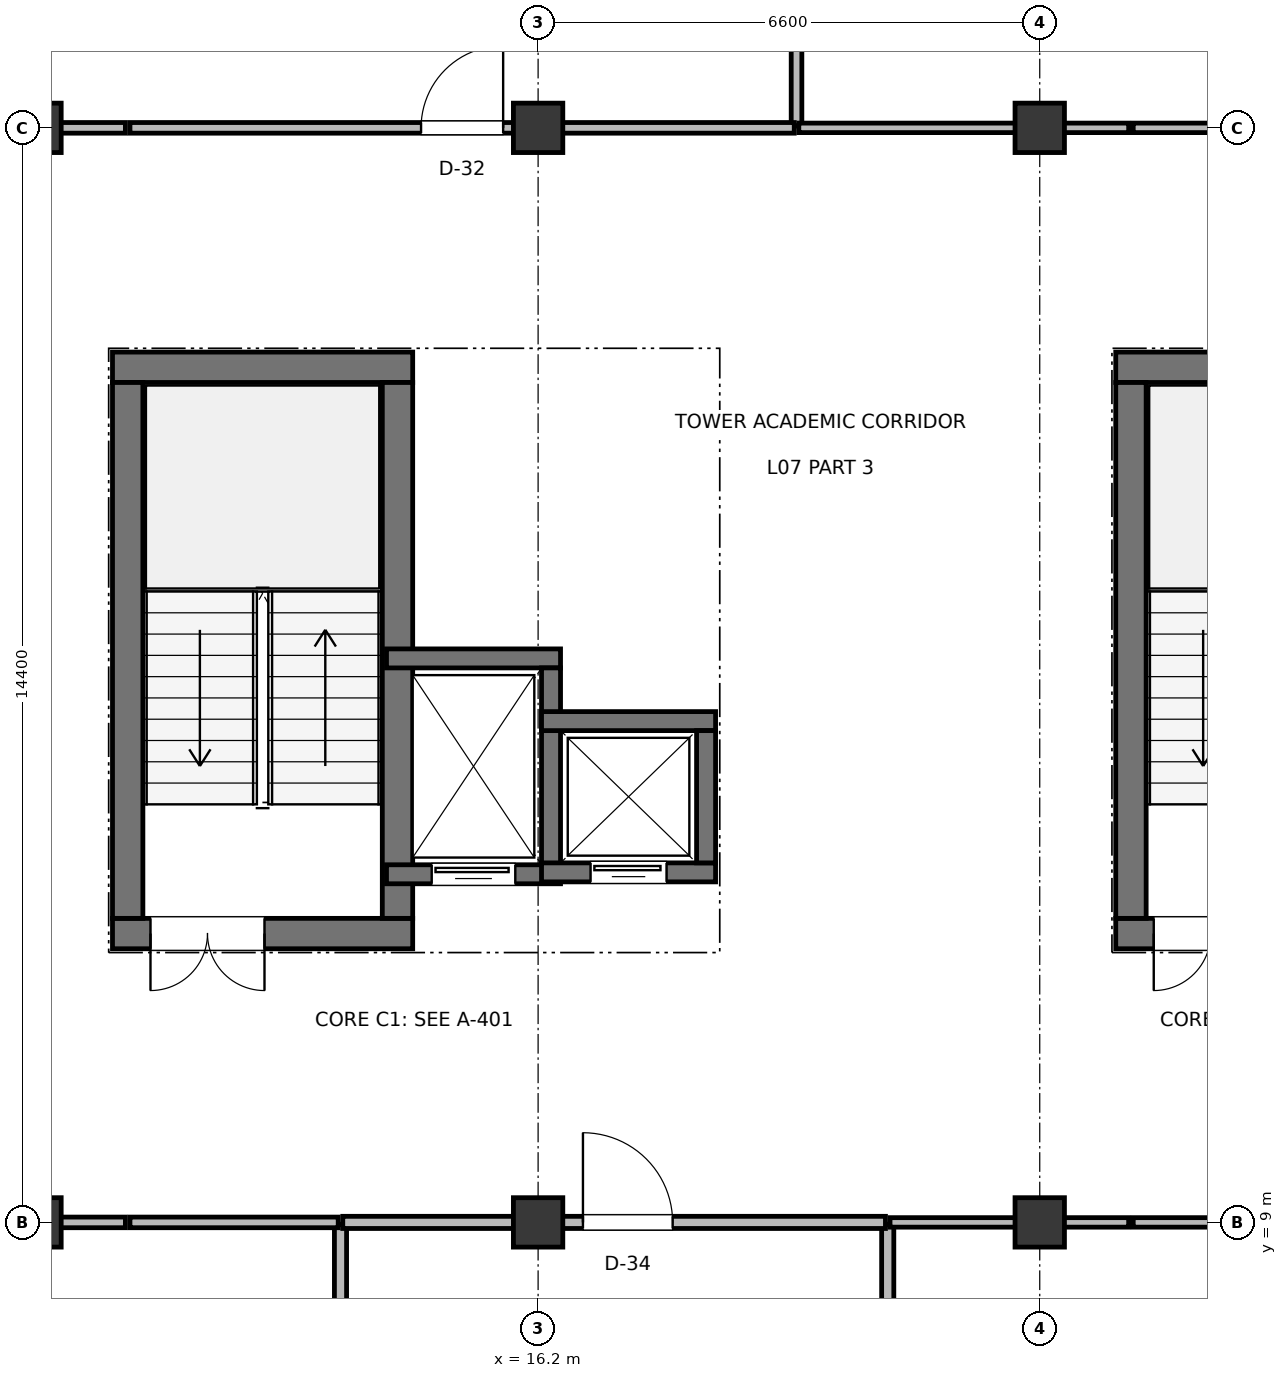
"""IFC4 building model, lengths in metres.
Left out: names, types, materials, properties, quantities, classifications, styles, units other than length and angle.
Written with IfcOpenShell. Run it as: python <this file> out.ifc"""

import sys

from ifc_helpers import new_model, si_unit, direction, frame, frame_2d, origin, origin_2d, place, context, subcontext, project, spatial, rectangle, extrude, element, fill, save


model = new_model("IFC4")
c1 = context("Model", 3, precision=1e-05, world=origin(), true_north=direction((0.0, 1.0)))
c2 = subcontext(c1, "Body", "Model", "MODEL_VIEW")
j1 = project(units=[si_unit("LENGTHUNIT", "METRE"), si_unit("PLANEANGLEUNIT", "RADIAN")], contexts=[c1])
p1 = place(None, origin())
s1 = spatial("IfcSite", under=j1, at=p1, CompositionType="ELEMENT")
p2 = place(p1, origin())
s2 = spatial("IfcBuilding", under=s1, at=p2, CompositionType="ELEMENT")
p3 = place(p2, frame((0.0, 0.0, 33.0)))
s3 = spatial("IfcBuildingStorey", under=s2, at=p3, CompositionType="ELEMENT", Elevation=33.0)
for number, where, z_axis, x_axis in (
    (1, (9.6, 9.0, 0.0), (0.0, 0.0, 1.0), (1.0, 0.0, 0.0)),
    (2, (9.6, 23.4, 0.0), (0.0, 0.0, 1.0), (1.0, 0.0, 0.0)),
    (3, (16.2, 9.0, 0.0), (0.0, 0.0, 1.0), (1.0, 0.0, 0.0)),
    (4, (16.2, 23.4, 0.0), (0.0, 0.0, 1.0), (1.0, 0.0, 0.0)),
    (5, (22.8, 9.0, 0.0), (0.0, 0.0, 1.0), (1.0, 0.0, 0.0)),
    (6, (22.8, 23.4, 0.0), (0.0, 0.0, 1.0), (1.0, 0.0, 0.0)),
):
    element("IfcColumn", number, at=place(p3, frame(where, z_axis=z_axis, x_axis=x_axis)), inside=s3, PredefinedType="COLUMN", context=c2, shape_type="SweptSolid", body=[
        extrude(rectangle(XDim=0.65, YDim=0.65, at=origin_2d()), origin(), (0.0, 0.0, 1.0), 3.8),
    ])
p4 = place(p3, frame((10.6, 12.8, 0.0), z_axis=(0.0, 0.0, 1.0), x_axis=(1.0, 0.0, 0.0)))
e7 = element("IfcWall", 7, at=p4, inside=s3, PredefinedType="SHEAR", context=c2, shape_type="SweptSolid", body=[
    extrude(rectangle(XDim=3.95, YDim=0.4, at=frame_2d((1.975, 0.0))), origin(), (0.0, 0.0, 1.0), 3.58),
])
p5 = place(p4, frame((0.5, 0.0, 0.0)))
e8 = element("IfcOpeningElement", 8, at=p5, cuts=e7, PredefinedType="OPENING", context=c2, shape_type="SweptSolid", body=[
    extrude(rectangle(XDim=1.5, YDim=2.2, at=frame_2d((0.75, 1.1))), frame((0.0, 0.21, 0.0), z_axis=(0.0, -1.0, 0.0), x_axis=(1.0, 0.0, 0.0)), (0.0, 0.0, 1.0), 0.42),
])
p6 = place(p3, frame((10.6, 20.25, 0.0), z_axis=(0.0, 0.0, 1.0), x_axis=(1.0, 0.0, 0.0)))
e9 = element("IfcWall", 9, at=p6, inside=s3, PredefinedType="SHEAR", context=c2, shape_type="SweptSolid", body=[
    extrude(rectangle(XDim=3.95, YDim=0.4, at=frame_2d((1.975, 0.0))), origin(), (0.0, 0.0, 1.0), 3.58),
])
for number, where, z_axis, x_axis in (
    (10, (10.8, 13.0, 0.0), (0.0, 0.0, 1.0), (0.0, 1.0, 0.0)),
    (11, (14.35, 13.0, 0.0), (0.0, 0.0, 1.0), (0.0, 1.0, 0.0)),
):
    element("IfcWall", number, at=place(p3, frame(where, z_axis=z_axis, x_axis=x_axis)), inside=s3, PredefinedType="SHEAR", context=c2, shape_type="SweptSolid", body=[
        extrude(rectangle(XDim=7.05, YDim=0.4, at=frame_2d((3.525, 0.0))), origin(), (0.0, 0.0, 1.0), 3.58),
    ])
p7 = place(p3, frame((14.205, 13.58, 0.0), z_axis=(0.0, 0.0, 1.0), x_axis=(1.0, 0.0, 0.0)))
e12 = element("IfcWall", 12, at=p7, inside=s3, PredefinedType="SHEAR", context=c2, shape_type="SweptSolid", body=[
    extrude(rectangle(XDim=2.29, YDim=0.25, at=frame_2d((1.145, 0.0))), origin(), (0.0, 0.0, 1.0), 3.56),
])
p8 = place(p7, frame((0.595, 0.0, 0.0)))
e13 = element("IfcOpeningElement", 13, at=p8, cuts=e12, PredefinedType="OPENING", context=c2, shape_type="SweptSolid", body=[
    extrude(rectangle(XDim=1.1, YDim=2.2, at=frame_2d((0.55, 1.1))), frame((0.0, 0.135, 0.0), z_axis=(0.0, -1.0, 0.0), x_axis=(1.0, 0.0, 0.0)), (0.0, 0.0, 1.0), 0.27),
])
p9 = place(p3, frame((14.205, 16.42, 0.0), z_axis=(0.0, 0.0, 1.0), x_axis=(1.0, 0.0, 0.0)))
e14 = element("IfcWall", 14, at=p9, inside=s3, PredefinedType="SHEAR", context=c2, shape_type="SweptSolid", body=[
    extrude(rectangle(XDim=2.29, YDim=0.25, at=frame_2d((1.145, 0.0))), origin(), (0.0, 0.0, 1.0), 3.56),
])
p10 = place(p3, frame((16.37, 13.705, 0.0), z_axis=(0.0, 0.0, 1.0), x_axis=(0.0, 1.0, 0.0)))
e15 = element("IfcWall", 15, at=p10, inside=s3, PredefinedType="SHEAR", context=c2, shape_type="SweptSolid", body=[
    extrude(rectangle(XDim=2.59, YDim=0.25, at=frame_2d((1.295, 0.0))), origin(), (0.0, 0.0, 1.0), 3.56),
])
p11 = place(p3, frame((16.245, 13.605, 0.0), z_axis=(0.0, 0.0, 1.0), x_axis=(1.0, 0.0, 0.0)))
e16 = element("IfcWall", 16, at=p11, inside=s3, PredefinedType="SHEAR", context=c2, shape_type="SweptSolid", body=[
    extrude(rectangle(XDim=2.29, YDim=0.25, at=frame_2d((1.145, 0.0))), origin(), (0.0, 0.0, 1.0), 3.56),
])
p12 = place(p11, frame((0.645, 0.0, 0.0)))
e17 = element("IfcOpeningElement", 17, at=p12, cuts=e16, PredefinedType="OPENING", context=c2, shape_type="SweptSolid", body=[
    extrude(rectangle(XDim=1.0, YDim=2.15, at=frame_2d((0.5, 1.075))), frame((0.0, 0.135, 0.0), z_axis=(0.0, -1.0, 0.0), x_axis=(1.0, 0.0, 0.0)), (0.0, 0.0, 1.0), 0.27),
])
p13 = place(p3, frame((16.245, 15.595, 0.0), z_axis=(0.0, 0.0, 1.0), x_axis=(1.0, 0.0, 0.0)))
e18 = element("IfcWall", 18, at=p13, inside=s3, PredefinedType="SHEAR", context=c2, shape_type="SweptSolid", body=[
    extrude(rectangle(XDim=2.29, YDim=0.25, at=frame_2d((1.145, 0.0))), origin(), (0.0, 0.0, 1.0), 3.56),
])
p14 = place(p3, frame((18.41, 13.73, 0.0), z_axis=(0.0, 0.0, 1.0), x_axis=(0.0, 1.0, 0.0)))
e19 = element("IfcWall", 19, at=p14, inside=s3, PredefinedType="SHEAR", context=c2, shape_type="SweptSolid", body=[
    extrude(rectangle(XDim=1.74, YDim=0.25, at=frame_2d((0.87, 0.0))), origin(), (0.0, 0.0, 1.0), 3.56),
])
p15 = place(p3, frame((23.8, 12.8, 0.0), z_axis=(0.0, 0.0, 1.0), x_axis=(1.0, 0.0, 0.0)))
e20 = element("IfcWall", 20, at=p15, inside=s3, PredefinedType="SHEAR", context=c2, shape_type="SweptSolid", body=[
    extrude(rectangle(XDim=3.95, YDim=0.4, at=frame_2d((1.975, 0.0))), origin(), (0.0, 0.0, 1.0), 3.58),
])
p16 = place(p15, frame((0.5, 0.0, 0.0)))
e21 = element("IfcOpeningElement", 21, at=p16, cuts=e20, PredefinedType="OPENING", context=c2, shape_type="SweptSolid", body=[
    extrude(rectangle(XDim=1.5, YDim=2.2, at=frame_2d((0.75, 1.1))), frame((0.0, 0.21, 0.0), z_axis=(0.0, -1.0, 0.0), x_axis=(1.0, 0.0, 0.0)), (0.0, 0.0, 1.0), 0.42),
])
p17 = place(p3, frame((23.8, 20.25, 0.0), z_axis=(0.0, 0.0, 1.0), x_axis=(1.0, 0.0, 0.0)))
e22 = element("IfcWall", 22, at=p17, inside=s3, PredefinedType="SHEAR", context=c2, shape_type="SweptSolid", body=[
    extrude(rectangle(XDim=3.95, YDim=0.4, at=frame_2d((1.975, 0.0))), origin(), (0.0, 0.0, 1.0), 3.58),
])
p18 = place(p3, frame((24.0, 13.0, 0.0), z_axis=(0.0, 0.0, 1.0), x_axis=(0.0, 1.0, 0.0)))
e23 = element("IfcWall", 23, at=p18, inside=s3, PredefinedType="SHEAR", context=c2, shape_type="SweptSolid", body=[
    extrude(rectangle(XDim=7.05, YDim=0.4, at=frame_2d((3.525, 0.0))), origin(), (0.0, 0.0, 1.0), 3.58),
])
p19 = place(p3, frame((13.6, 3.23, 0.0), z_axis=(0.0, 0.0, 1.0), x_axis=(0.0, 1.0, 0.0)))
e24 = element("IfcWall", 24, at=p19, inside=s3, PredefinedType="PARTITIONING", context=c2, shape_type="SweptSolid", body=[
    extrude(rectangle(XDim=5.74, YDim=0.16, at=frame_2d((2.87, 0.0))), origin(), (0.0, 0.0, 1.0), 2.825),
])
p20 = place(p3, frame((3.23, 9.0, 0.0), z_axis=(0.0, 0.0, 1.0), x_axis=(1.0, 0.0, 0.0)))
e25 = element("IfcWall", 25, at=p20, inside=s3, PredefinedType="PARTITIONING", context=c2, shape_type="SweptSolid", body=[
    extrude(rectangle(XDim=7.54, YDim=0.14, at=frame_2d((3.77, 0.0))), origin(), (0.0, 0.0, 1.0), 2.795),
])
p21 = place(p20, frame((3.195, 0.0, 0.0)))
e26 = element("IfcOpeningElement", 26, at=p21, cuts=e25, PredefinedType="OPENING", context=c2, shape_type="SweptSolid", body=[
    extrude(rectangle(XDim=1.15, YDim=2.15, at=frame_2d((0.575, 1.075))), frame((0.0, 0.08, 0.0), z_axis=(0.0, -1.0, 0.0), x_axis=(1.0, 0.0, 0.0)), (0.0, 0.0, 1.0), 0.16),
])
p22 = place(p3, frame((10.83, 9.0, 0.0), z_axis=(0.0, 0.0, 1.0), x_axis=(1.0, 0.0, 0.0)))
e27 = element("IfcWall", 27, at=p22, inside=s3, PredefinedType="PARTITIONING", context=c2, shape_type="SweptSolid", body=[
    extrude(rectangle(XDim=2.74, YDim=0.14, at=frame_2d((1.37, 0.0))), origin(), (0.0, 0.0, 1.0), 2.825),
])
p23 = place(p3, frame((20.8, 3.23, 0.0), z_axis=(0.0, 0.0, 1.0), x_axis=(0.0, 1.0, 0.0)))
e28 = element("IfcWall", 28, at=p23, inside=s3, PredefinedType="PARTITIONING", context=c2, shape_type="SweptSolid", body=[
    extrude(rectangle(XDim=5.74, YDim=0.16, at=frame_2d((2.87, 0.0))), origin(), (0.0, 0.0, 1.0), 2.755),
])
p24 = place(p3, frame((13.63, 9.0, 0.0), z_axis=(0.0, 0.0, 1.0), x_axis=(1.0, 0.0, 0.0)))
e29 = element("IfcWall", 29, at=p24, inside=s3, PredefinedType="PARTITIONING", context=c2, shape_type="SweptSolid", body=[
    extrude(rectangle(XDim=7.14, YDim=0.16, at=frame_2d((3.57, 0.0))), origin(), (0.0, 0.0, 1.0), 2.755),
])
p25 = place(p24, frame((3.16, 0.0, 0.0)))
e30 = element("IfcOpeningElement", 30, at=p25, cuts=e29, PredefinedType="OPENING", context=c2, shape_type="SweptSolid", body=[
    extrude(rectangle(XDim=1.18, YDim=2.2, at=frame_2d((0.59, 1.1))), frame((0.0, 0.09, 0.0), z_axis=(0.0, -1.0, 0.0), x_axis=(1.0, 0.0, 0.0)), (0.0, 0.0, 1.0), 0.18),
])
p26 = place(p3, frame((24.03, 9.0, 0.0), z_axis=(0.0, 0.0, 1.0), x_axis=(1.0, 0.0, 0.0)))
e31 = element("IfcWall", 31, at=p26, inside=s3, PredefinedType="PARTITIONING", context=c2, shape_type="SweptSolid", body=[
    extrude(rectangle(XDim=5.14, YDim=0.125, at=frame_2d((2.57, 0.0))), origin(), (0.0, 0.0, 1.0), 2.825),
])
p27 = place(p26, frame((2.07, 0.0, 0.0)))
e32 = element("IfcOpeningElement", 32, at=p27, cuts=e31, PredefinedType="OPENING", context=c2, shape_type="SweptSolid", body=[
    extrude(rectangle(XDim=1.0, YDim=2.15, at=frame_2d((0.5, 1.075))), frame((0.0, 0.073, 0.0), z_axis=(0.0, -1.0, 0.0), x_axis=(1.0, 0.0, 0.0)), (0.0, 0.0, 1.0), 0.145),
])
p28 = place(p3, frame((20.83, 9.0, 0.0), z_axis=(0.0, 0.0, 1.0), x_axis=(1.0, 0.0, 0.0)))
e33 = element("IfcWall", 33, at=p28, inside=s3, PredefinedType="PARTITIONING", context=c2, shape_type="SweptSolid", body=[
    extrude(rectangle(XDim=3.14, YDim=0.125, at=frame_2d((1.57, 0.0))), origin(), (0.0, 0.0, 1.0), 2.755),
])
p29 = place(p3, frame((19.6, 23.43, 0.0), z_axis=(0.0, 0.0, 1.0), x_axis=(0.0, 1.0, 0.0)))
e34 = element("IfcWall", 34, at=p29, inside=s3, PredefinedType="PARTITIONING", context=c2, shape_type="SweptSolid", body=[
    extrude(rectangle(XDim=6.34, YDim=0.14, at=frame_2d((3.17, 0.0))), origin(), (0.0, 0.0, 1.0), 2.645),
])
p30 = place(p3, frame((9.63, 23.4, 0.0), z_axis=(0.0, 0.0, 1.0), x_axis=(1.0, 0.0, 0.0)))
e35 = element("IfcWall", 35, at=p30, inside=s3, PredefinedType="PARTITIONING", context=c2, shape_type="SweptSolid", body=[
    extrude(rectangle(XDim=1.14, YDim=0.14, at=frame_2d((0.57, 0.0))), origin(), (0.0, 0.0, 1.0), 2.775),
])
p31 = place(p3, frame((10.83, 23.4, 0.0), z_axis=(0.0, 0.0, 1.0), x_axis=(1.0, 0.0, 0.0)))
e36 = element("IfcWall", 36, at=p31, inside=s3, PredefinedType="PARTITIONING", context=c2, shape_type="SweptSolid", body=[
    extrude(rectangle(XDim=8.74, YDim=0.14, at=frame_2d((4.37, 0.0))), origin(), (0.0, 0.0, 1.0), 2.645),
])
p32 = place(p31, frame((3.83, 0.0, 0.0)))
e37 = element("IfcOpeningElement", 37, at=p32, cuts=e36, PredefinedType="OPENING", context=c2, shape_type="SweptSolid", body=[
    extrude(rectangle(XDim=1.08, YDim=2.15, at=frame_2d((0.54, 1.075))), frame((0.0, 0.08, 0.0), z_axis=(0.0, -1.0, 0.0), x_axis=(1.0, 0.0, 0.0)), (0.0, 0.0, 1.0), 0.16),
])
p33 = place(p3, frame((24.03, 23.4, 0.0), z_axis=(0.0, 0.0, 1.0), x_axis=(1.0, 0.0, 0.0)))
e38 = element("IfcWall", 38, at=p33, inside=s3, PredefinedType="PARTITIONING", context=c2, shape_type="SweptSolid", body=[
    extrude(rectangle(XDim=5.14, YDim=0.125, at=frame_2d((2.57, 0.0))), origin(), (0.0, 0.0, 1.0), 2.775),
])
p34 = place(p33, frame((2.07, 0.0, 0.0)))
e39 = element("IfcOpeningElement", 39, at=p34, cuts=e38, PredefinedType="OPENING", context=c2, shape_type="SweptSolid", body=[
    extrude(rectangle(XDim=1.0, YDim=2.15, at=frame_2d((0.5, 1.075))), frame((0.0, 0.073, 0.0), z_axis=(0.0, -1.0, 0.0), x_axis=(1.0, 0.0, 0.0)), (0.0, 0.0, 1.0), 0.145),
])
p35 = place(p3, frame((19.63, 23.4, 0.0), z_axis=(0.0, 0.0, 1.0), x_axis=(1.0, 0.0, 0.0)))
e40 = element("IfcWall", 40, at=p35, inside=s3, PredefinedType="PARTITIONING", context=c2, shape_type="SweptSolid", body=[
    extrude(rectangle(XDim=4.34, YDim=0.125, at=frame_2d((2.17, 0.0))), origin(), (0.0, 0.0, 1.0), 2.645),
])
p36 = place(p5, frame((1.5, 0.0, 0.0), z_axis=(0.0, 0.0, 1.0), x_axis=(-1.0, 0.0, 0.0)))
e41 = element("IfcDoor", 41, at=p36, inside=s3, OperationType="DOUBLE_DOOR_SINGLE_SWING", PredefinedType="DOOR", context=c2, shape_type="SweptSolid", body=[
    extrude(rectangle(XDim=1.5, YDim=2.2, at=frame_2d((0.75, 1.1))), frame((0.0, 0.025, 0.0), z_axis=(0.0, -1.0, 0.0), x_axis=(1.0, 0.0, 0.0)), (0.0, 0.0, 1.0), 0.05),
])
fill(e8, e41)
p37 = place(p8, frame((1.1, 0.0, 0.0), z_axis=(0.0, 0.0, 1.0), x_axis=(-1.0, 0.0, 0.0)))
e42 = element("IfcDoor", 42, at=p37, inside=s3, OperationType="SLIDING_TO_LEFT", PredefinedType="DOOR", context=c2, shape_type="SweptSolid", body=[
    extrude(rectangle(XDim=1.1, YDim=2.2, at=frame_2d((0.55, 1.1))), frame((0.0, 0.025, 0.0), z_axis=(0.0, -1.0, 0.0), x_axis=(1.0, 0.0, 0.0)), (0.0, 0.0, 1.0), 0.05),
])
fill(e13, e42)
p38 = place(p12, frame((1.0, 0.0, 0.0), z_axis=(0.0, 0.0, 1.0), x_axis=(-1.0, 0.0, 0.0)))
e43 = element("IfcDoor", 43, at=p38, inside=s3, OperationType="SLIDING_TO_LEFT", PredefinedType="DOOR", context=c2, shape_type="SweptSolid", body=[
    extrude(rectangle(XDim=1.0, YDim=2.15, at=frame_2d((0.5, 1.075))), frame((0.0, 0.025, 0.0), z_axis=(0.0, -1.0, 0.0), x_axis=(1.0, 0.0, 0.0)), (0.0, 0.0, 1.0), 0.05),
])
fill(e17, e43)
p39 = place(p16, frame((1.5, 0.0, 0.0), z_axis=(0.0, 0.0, 1.0), x_axis=(-1.0, 0.0, 0.0)))
e44 = element("IfcDoor", 44, at=p39, inside=s3, OperationType="DOUBLE_DOOR_SINGLE_SWING", PredefinedType="DOOR", context=c2, shape_type="SweptSolid", body=[
    extrude(rectangle(XDim=1.5, YDim=2.2, at=frame_2d((0.75, 1.1))), frame((0.0, 0.025, 0.0), z_axis=(0.0, -1.0, 0.0), x_axis=(1.0, 0.0, 0.0)), (0.0, 0.0, 1.0), 0.05),
])
fill(e21, e44)
p40 = place(p25, origin())
e45 = element("IfcDoor", 45, at=p40, inside=s3, OperationType="SINGLE_SWING_LEFT", PredefinedType="DOOR", context=c2, shape_type="SweptSolid", body=[
    extrude(rectangle(XDim=1.18, YDim=2.2, at=frame_2d((0.59, 1.1))), frame((0.0, 0.025, 0.0), z_axis=(0.0, -1.0, 0.0), x_axis=(1.0, 0.0, 0.0)), (0.0, 0.0, 1.0), 0.05),
])
fill(e30, e45)
p41 = place(p32, origin())
e46 = element("IfcDoor", 46, at=p41, inside=s3, OperationType="SINGLE_SWING_RIGHT", PredefinedType="DOOR", context=c2, shape_type="SweptSolid", body=[
    extrude(rectangle(XDim=1.08, YDim=2.15, at=frame_2d((0.54, 1.075))), frame((0.0, 0.025, 0.0), z_axis=(0.0, -1.0, 0.0), x_axis=(1.0, 0.0, 0.0)), (0.0, 0.0, 1.0), 0.05),
])
fill(e37, e46)
save(model, sys.argv[1])
